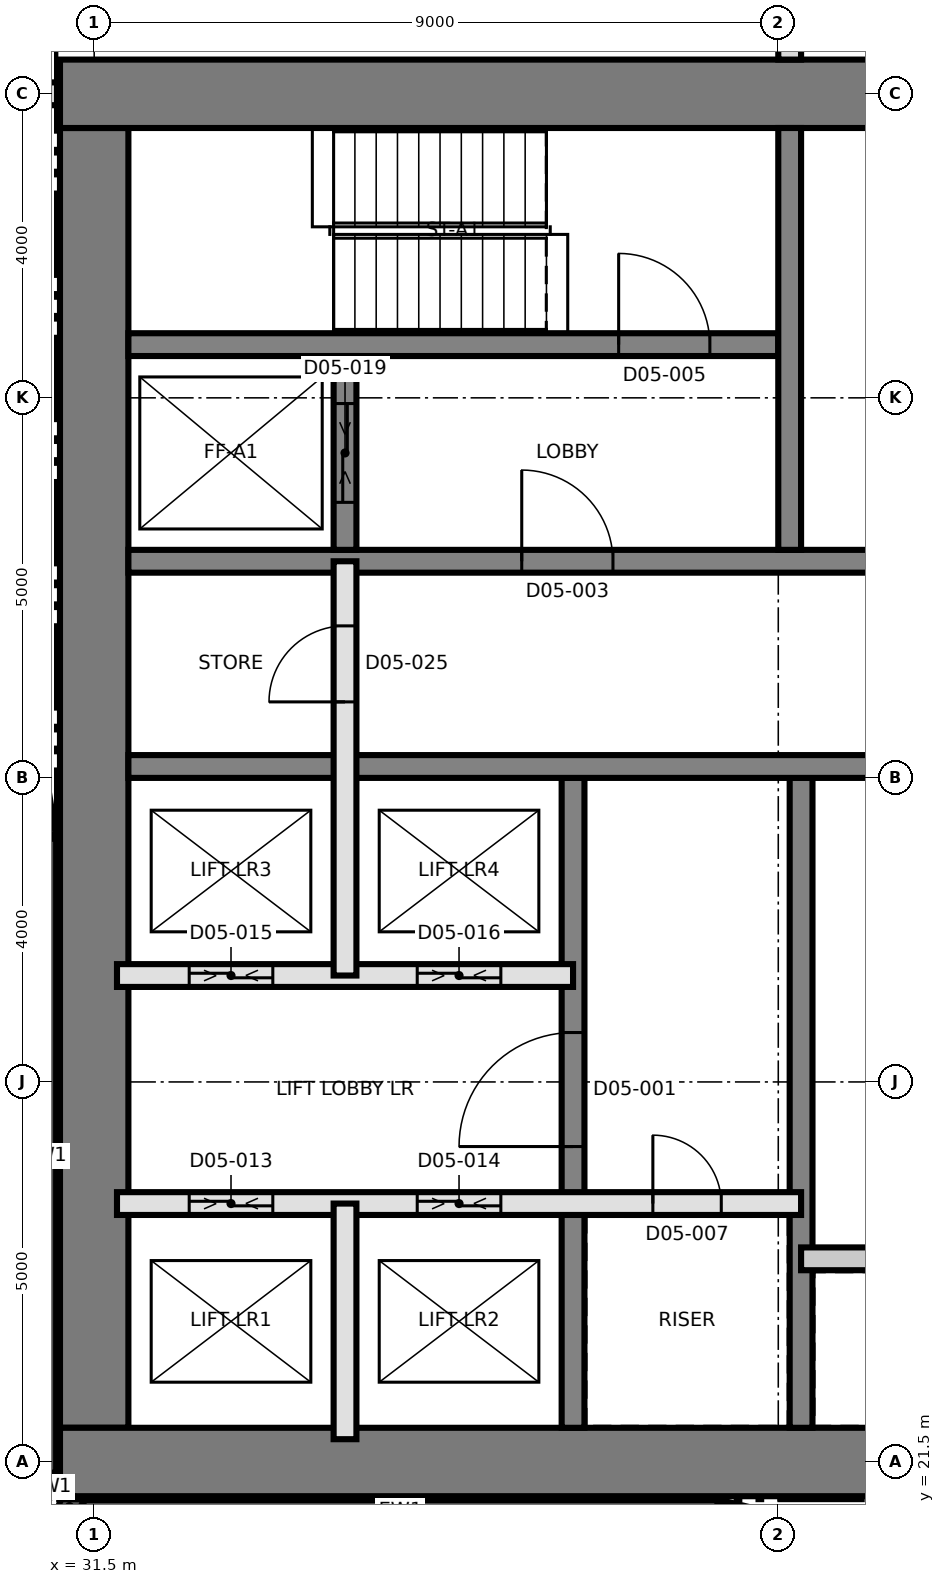
"""IFC4 building model, lengths in metres.
Left out: names, types, materials, properties, quantities, classifications, styles, units other than length and angle.
Written with IfcOpenShell. Run it as: python <this file> out.ifc"""

import sys

from ifc_helpers import new_model, si_unit, direction, frame, frame_2d, origin, place, context, subcontext, project, spatial, rectangle, extrude, element, fill, save


model = new_model("IFC4")
c1 = context("Model", 3, precision=1e-05, world=origin(), true_north=direction((0.0, 1.0)))
c2 = subcontext(c1, "Body", "Model", "MODEL_VIEW")
j1 = project(units=[si_unit("LENGTHUNIT", "METRE"), si_unit("PLANEANGLEUNIT", "RADIAN")], contexts=[c1])
p1 = place(None, origin())
s1 = spatial("IfcSite", under=j1, at=p1, CompositionType="ELEMENT")
p2 = place(p1, origin())
s2 = spatial("IfcBuilding", under=s1, at=p2, CompositionType="ELEMENT")
p3 = place(p2, frame((0.0, 0.0, 74.2)))
s3 = spatial("IfcBuildingStorey", under=s2, at=p3, CompositionType="ELEMENT", Elevation=74.2)
p4 = place(p3, frame((31.5, 21.95, 0.0), z_axis=(0.0, 0.0, 1.0), x_axis=(0.0, 1.0, 0.0)))
e1 = element("IfcWall", 1, at=p4, inside=s3, PredefinedType="SHEAR", context=c2, shape_type="SweptSolid", body=[
    extrude(rectangle(XDim=17.1, YDim=0.9, at=frame_2d((8.55, 0.0))), origin(), (0.0, 0.0, 1.0), 3.7),
])
p5 = place(p3, frame((31.05, 21.5, 0.0), z_axis=(0.0, 0.0, 1.0), x_axis=(1.0, 0.0, 0.0)))
e2 = element("IfcWall", 2, at=p5, inside=s3, PredefinedType="SHEAR", context=c2, shape_type="SweptSolid", body=[
    extrude(rectangle(XDim=27.0, YDim=0.9, at=frame_2d((13.5, 0.0))), origin(), (0.0, 0.0, 1.0), 3.7),
])
p6 = place(p3, frame((31.05, 39.5, 0.0), z_axis=(0.0, 0.0, 1.0), x_axis=(1.0, 0.0, 0.0)))
e3 = element("IfcWall", 3, at=p6, inside=s3, PredefinedType="SHEAR", context=c2, shape_type="SweptSolid", body=[
    extrude(rectangle(XDim=27.0, YDim=0.9, at=frame_2d((13.5, 0.0))), origin(), (0.0, 0.0, 1.0), 3.7),
])
p7 = place(p6, frame((10.65, 0.0, 0.0)))
e4 = element("IfcOpeningElement", 4, at=p7, cuts=e3, PredefinedType="OPENING", context=c2, shape_type="SweptSolid", body=[
    extrude(rectangle(XDim=1.2, YDim=2.1, at=frame_2d((0.6, 1.05))), frame((0.0, 0.46, 0.0), z_axis=(0.0, -1.0, 0.0), x_axis=(1.0, 0.0, 0.0)), (0.0, 0.0, 1.0), 0.92),
])
p8 = place(p3, frame((37.8, 21.95, 0.0), z_axis=(0.0, 0.0, 1.0), x_axis=(0.0, 1.0, 0.0)))
e5 = element("IfcWall", 5, at=p8, inside=s3, PredefinedType="SHEAR", context=c2, shape_type="SweptSolid", body=[
    extrude(rectangle(XDim=8.55, YDim=0.3, at=frame_2d((4.275, 0.0))), origin(), (0.0, 0.0, 1.0), 3.7),
])
p9 = place(p8, frame((3.7, 0.0, 0.0)))
e6 = element("IfcOpeningElement", 6, at=p9, cuts=e5, PredefinedType="OPENING", context=c2, shape_type="SweptSolid", body=[
    extrude(rectangle(XDim=1.5, YDim=2.1, at=frame_2d((0.75, 1.05))), frame((0.0, 0.16, 0.0), z_axis=(0.0, -1.0, 0.0), x_axis=(1.0, 0.0, 0.0)), (0.0, 0.0, 1.0), 0.32),
])
p10 = place(p3, frame((40.8, 21.95, 0.0), z_axis=(0.0, 0.0, 1.0), x_axis=(0.0, 1.0, 0.0)))
e7 = element("IfcWall", 7, at=p10, inside=s3, PredefinedType="SHEAR", context=c2, shape_type="SweptSolid", body=[
    extrude(rectangle(XDim=8.55, YDim=0.3, at=frame_2d((4.275, 0.0))), origin(), (0.0, 0.0, 1.0), 3.7),
])
p11 = place(p3, frame((31.95, 30.65, 0.0), z_axis=(0.0, 0.0, 1.0), x_axis=(1.0, 0.0, 0.0)))
e8 = element("IfcWall", 8, at=p11, inside=s3, PredefinedType="SHEAR", context=c2, shape_type="SweptSolid", body=[
    extrude(rectangle(XDim=26.1, YDim=0.3, at=frame_2d((13.05, 0.0))), origin(), (0.0, 0.0, 1.0), 3.7),
])
p12 = place(p11, frame((24.55, 0.0, 0.0)))
e9 = element("IfcOpeningElement", 9, at=p12, cuts=e8, PredefinedType="OPENING", context=c2, shape_type="SweptSolid", body=[
    extrude(rectangle(XDim=1.0, YDim=2.1, at=frame_2d((0.5, 1.05))), frame((0.0, 0.16, 0.0), z_axis=(0.0, -1.0, 0.0), x_axis=(1.0, 0.0, 0.0)), (0.0, 0.0, 1.0), 0.32),
])
p13 = place(p11, frame((11.35, 0.0, 0.0)))
e10 = element("IfcOpeningElement", 10, at=p13, cuts=e8, PredefinedType="OPENING", context=c2, shape_type="SweptSolid", body=[
    extrude(rectangle(XDim=1.0, YDim=2.1, at=frame_2d((0.5, 1.05))), frame((0.0, 0.16, 0.0), z_axis=(0.0, -1.0, 0.0), x_axis=(1.0, 0.0, 0.0)), (0.0, 0.0, 1.0), 0.32),
])
p14 = place(p3, frame((31.95, 33.35, 0.0), z_axis=(0.0, 0.0, 1.0), x_axis=(1.0, 0.0, 0.0)))
e11 = element("IfcWall", 11, at=p14, inside=s3, PredefinedType="SHEAR", context=c2, shape_type="SweptSolid", body=[
    extrude(rectangle(XDim=26.1, YDim=0.3, at=frame_2d((13.05, 0.0))), origin(), (0.0, 0.0, 1.0), 3.7),
])
p15 = place(p14, frame((13.7, 0.0, 0.0)))
e12 = element("IfcOpeningElement", 12, at=p15, cuts=e11, PredefinedType="OPENING", context=c2, shape_type="SweptSolid", body=[
    extrude(rectangle(XDim=1.4, YDim=2.1, at=frame_2d((0.7, 1.05))), frame((0.0, 0.16, 0.0), z_axis=(0.0, -1.0, 0.0), x_axis=(1.0, 0.0, 0.0)), (0.0, 0.0, 1.0), 0.32),
])
p16 = place(p14, frame((5.175, 0.0, 0.0)))
e13 = element("IfcOpeningElement", 13, at=p16, cuts=e11, PredefinedType="OPENING", context=c2, shape_type="SweptSolid", body=[
    extrude(rectangle(XDim=1.2, YDim=2.1, at=frame_2d((0.6, 1.05))), frame((0.0, 0.16, 0.0), z_axis=(0.0, -1.0, 0.0), x_axis=(1.0, 0.0, 0.0)), (0.0, 0.0, 1.0), 0.32),
])
p17 = place(p14, frame((19.725, 0.0, 0.0)))
e14 = element("IfcOpeningElement", 14, at=p17, cuts=e11, PredefinedType="OPENING", context=c2, shape_type="SweptSolid", body=[
    extrude(rectangle(XDim=1.2, YDim=2.1, at=frame_2d((0.6, 1.05))), frame((0.0, 0.16, 0.0), z_axis=(0.0, -1.0, 0.0), x_axis=(1.0, 0.0, 0.0)), (0.0, 0.0, 1.0), 0.32),
])
p18 = place(p3, frame((31.95, 36.2, 0.0), z_axis=(0.0, 0.0, 1.0), x_axis=(1.0, 0.0, 0.0)))
e15 = element("IfcWall", 15, at=p18, inside=s3, PredefinedType="SHEAR", context=c2, shape_type="SweptSolid", body=[
    extrude(rectangle(XDim=8.55, YDim=0.3, at=frame_2d((4.275, 0.0))), origin(), (0.0, 0.0, 1.0), 3.7),
])
p19 = place(p18, frame((6.45, 0.0, 0.0)))
e16 = element("IfcOpeningElement", 16, at=p19, cuts=e15, PredefinedType="OPENING", context=c2, shape_type="SweptSolid", body=[
    extrude(rectangle(XDim=1.2, YDim=2.1, at=frame_2d((0.6, 1.05))), frame((0.0, 0.16, 0.0), z_axis=(0.0, -1.0, 0.0), x_axis=(1.0, 0.0, 0.0)), (0.0, 0.0, 1.0), 0.32),
])
p20 = place(p3, frame((40.65, 33.5, 0.0), z_axis=(0.0, 0.0, 1.0), x_axis=(0.0, 1.0, 0.0)))
e17 = element("IfcWall", 17, at=p20, inside=s3, PredefinedType="SHEAR", context=c2, shape_type="SweptSolid", body=[
    extrude(rectangle(XDim=5.55, YDim=0.3, at=frame_2d((2.775, 0.0))), origin(), (0.0, 0.0, 1.0), 3.7),
])
p21 = place(p3, frame((34.8, 33.5, 0.0), z_axis=(0.0, 0.0, 1.0), x_axis=(0.0, 1.0, 0.0)))
e18 = element("IfcWall", 18, at=p21, inside=s3, PredefinedType="SHEAR", context=c2, shape_type="SweptSolid", body=[
    extrude(rectangle(XDim=2.55, YDim=0.3, at=frame_2d((1.275, 0.0))), origin(), (0.0, 0.0, 1.0), 3.7),
])
p22 = place(p21, frame((0.625, 0.0, 0.0)))
e19 = element("IfcOpeningElement", 19, at=p22, cuts=e18, PredefinedType="OPENING", context=c2, shape_type="SweptSolid", body=[
    extrude(rectangle(XDim=1.3, YDim=2.4, at=frame_2d((0.65, 1.2))), frame((0.0, 0.16, 0.0), z_axis=(0.0, -1.0, 0.0), x_axis=(1.0, 0.0, 0.0)), (0.0, 0.0, 1.0), 0.32),
])
p23 = place(p3, frame((30.85, 29.699, 0.0), z_axis=(0.0, 0.0, 1.0), x_axis=(0.0, -1.0, 0.0)))
e20 = element("IfcWall", 20, at=p23, inside=s3, PredefinedType="SOLIDWALL", context=c2, shape_type="SweptSolid", body=[
    extrude(rectangle(XDim=8.34, YDim=0.3, at=frame_2d((4.17, 0.0))), origin(), (0.0, 0.0, 1.0), 3.4),
])
for number, where, z_axis, x_axis in (
    (21, (30.861, 21.302, 0.0), (0.0, 0.0, 1.0), (0.383, -0.924, 0.0)),
    (22, (31.048, 20.967, 0.0), (0.0, 0.0, 1.0), (0.924, -0.383, 0.0)),
):
    element("IfcWall", number, at=place(p3, frame(where, z_axis=z_axis, x_axis=x_axis)), inside=s3, PredefinedType="SOLIDWALL", context=c2, shape_type="SweptSolid", body=[
        extrude(rectangle(XDim=0.275, YDim=0.3, at=frame_2d((0.138, 0.0))), origin(), (0.0, 0.0, 1.0), 3.4),
    ])
p24 = place(p3, frame((31.36, 20.85, 0.0), z_axis=(0.0, 0.0, 1.0), x_axis=(1.0, 0.0, 0.0)))
e23 = element("IfcWall", 23, at=p24, inside=s3, PredefinedType="SOLIDWALL", context=c2, shape_type="SweptSolid", body=[
    extrude(rectangle(XDim=8.34, YDim=0.3, at=frame_2d((4.17, 0.0))), origin(), (0.0, 0.0, 1.0), 3.4),
])
p25 = place(p3, frame((39.735, 20.846, 0.0), z_axis=(0.0, 0.0, 1.0), x_axis=(0.97206095595, -0.234728562212, 0.0)))
e24 = element("IfcWall", 24, at=p25, inside=s3, PredefinedType="SOLIDWALL", context=c2, shape_type="SweptSolid", body=[
    extrude(rectangle(XDim=2.35, YDim=0.3, at=frame_2d((1.175, 0.0))), origin(), (0.0, 0.0, 1.0), 3.4),
])
p26 = place(p3, frame((30.152, 34.0, 0.0), z_axis=(0.0, 0.0, 1.0), x_axis=(0.160697303067, -0.987003736967, 0.0)))
e25 = element("IfcWall", 25, at=p26, inside=s3, PredefinedType="SOLIDWALL", context=c2, shape_type="SweptSolid", body=[
    extrude(rectangle(XDim=4.333, YDim=0.3, at=frame_2d((2.167, 0.0))), origin(), (0.0, 0.0, 1.0), 3.4),
])
p27 = place(p26, frame((0.366, 0.0, 0.9)))
e26 = element("IfcOpeningElement", 26, at=p27, cuts=e25, PredefinedType="OPENING", context=c2, shape_type="SweptSolid", body=[
    extrude(rectangle(XDim=3.6, YDim=1.5, at=frame_2d((1.8, 0.75))), frame((0.0, 0.16, 0.0), z_axis=(0.0, -1.0, 0.0), x_axis=(1.0, 0.0, 0.0)), (0.0, 0.0, 1.0), 0.32),
])
p28 = place(p3, frame((40.8, 24.173, 0.0), z_axis=(0.0, 0.0, 1.0), x_axis=(1.0, 0.0, 0.0)))
e27 = element("IfcWall", 27, at=p28, inside=s3, PredefinedType="PARTITIONING", context=c2, shape_type="SweptSolid", body=[
    extrude(rectangle(XDim=6.0, YDim=0.3, at=frame_2d((3.0, 0.0))), origin(), (0.0, 0.0, 1.0), 3.4),
])
p29 = place(p28, frame((2.5, 0.0, 0.0)))
e28 = element("IfcOpeningElement", 28, at=p29, cuts=e27, PredefinedType="OPENING", context=c2, shape_type="SweptSolid", body=[
    extrude(rectangle(XDim=1.0, YDim=2.1, at=frame_2d((0.5, 1.05))), frame((0.0, 0.16, 0.0), z_axis=(0.0, -1.0, 0.0), x_axis=(1.0, 0.0, 0.0)), (0.0, 0.0, 1.0), 0.32),
])
p30 = place(p3, frame((31.8, 24.9, 0.0), z_axis=(0.0, 0.0, 1.0), x_axis=(1.0, 0.0, 0.0)))
e29 = element("IfcWall", 29, at=p30, inside=s3, PredefinedType="SOLIDWALL", context=c2, shape_type="SweptSolid", body=[
    extrude(rectangle(XDim=9.0, YDim=0.3, at=frame_2d((4.5, 0.0))), origin(), (0.0, 0.0, 1.0), 3.4),
])
p31 = place(p30, frame((7.05, 0.0, 0.0)))
e30 = element("IfcOpeningElement", 30, at=p31, cuts=e29, PredefinedType="OPENING", context=c2, shape_type="SweptSolid", body=[
    extrude(rectangle(XDim=0.9, YDim=2.1, at=frame_2d((0.45, 1.05))), frame((0.0, 0.16, 0.0), z_axis=(0.0, -1.0, 0.0), x_axis=(1.0, 0.0, 0.0)), (0.0, 0.0, 1.0), 0.32),
])
p32 = place(p30, frame((0.95, 0.0, 0.0)))
e31 = element("IfcOpeningElement", 31, at=p32, cuts=e29, PredefinedType="OPENING", context=c2, shape_type="SweptSolid", body=[
    extrude(rectangle(XDim=1.1, YDim=2.4, at=frame_2d((0.55, 1.2))), frame((0.0, 0.16, 0.0), z_axis=(0.0, -1.0, 0.0), x_axis=(1.0, 0.0, 0.0)), (0.0, 0.0, 1.0), 0.32),
])
p33 = place(p30, frame((3.95, 0.0, 0.0)))
e32 = element("IfcOpeningElement", 32, at=p33, cuts=e29, PredefinedType="OPENING", context=c2, shape_type="SweptSolid", body=[
    extrude(rectangle(XDim=1.1, YDim=2.4, at=frame_2d((0.55, 1.2))), frame((0.0, 0.16, 0.0), z_axis=(0.0, -1.0, 0.0), x_axis=(1.0, 0.0, 0.0)), (0.0, 0.0, 1.0), 0.32),
])
p34 = place(p3, frame((31.8, 27.9, 0.0), z_axis=(0.0, 0.0, 1.0), x_axis=(1.0, 0.0, 0.0)))
e33 = element("IfcWall", 33, at=p34, inside=s3, PredefinedType="SOLIDWALL", context=c2, shape_type="SweptSolid", body=[
    extrude(rectangle(XDim=6.0, YDim=0.3, at=frame_2d((3.0, 0.0))), origin(), (0.0, 0.0, 1.0), 3.4),
])
p35 = place(p34, frame((0.95, 0.0, 0.0)))
e34 = element("IfcOpeningElement", 34, at=p35, cuts=e33, PredefinedType="OPENING", context=c2, shape_type="SweptSolid", body=[
    extrude(rectangle(XDim=1.1, YDim=2.4, at=frame_2d((0.55, 1.2))), frame((0.0, 0.16, 0.0), z_axis=(0.0, -1.0, 0.0), x_axis=(1.0, 0.0, 0.0)), (0.0, 0.0, 1.0), 0.32),
])
p36 = place(p34, frame((3.95, 0.0, 0.0)))
e35 = element("IfcOpeningElement", 35, at=p36, cuts=e33, PredefinedType="OPENING", context=c2, shape_type="SweptSolid", body=[
    extrude(rectangle(XDim=1.1, YDim=2.4, at=frame_2d((0.55, 1.2))), frame((0.0, 0.16, 0.0), z_axis=(0.0, -1.0, 0.0), x_axis=(1.0, 0.0, 0.0)), (0.0, 0.0, 1.0), 0.32),
])
p37 = place(p3, frame((34.8, 21.8, 0.0), z_axis=(0.0, 0.0, 1.0), x_axis=(0.0, 1.0, 0.0)))
e36 = element("IfcWall", 36, at=p37, inside=s3, PredefinedType="SOLIDWALL", context=c2, shape_type="SweptSolid", body=[
    extrude(rectangle(XDim=3.1, YDim=0.3, at=frame_2d((1.55, 0.0))), origin(), (0.0, 0.0, 1.0), 3.4),
])
p38 = place(p3, frame((34.8, 27.9, 0.0), z_axis=(0.0, 0.0, 1.0), x_axis=(0.0, 1.0, 0.0)))
e37 = element("IfcWall", 37, at=p38, inside=s3, PredefinedType="SOLIDWALL", context=c2, shape_type="SweptSolid", body=[
    extrude(rectangle(XDim=5.45, YDim=0.3, at=frame_2d((2.725, 0.0))), origin(), (0.0, 0.0, 1.0), 3.4),
])
p39 = place(p38, frame((3.6, 0.0, 0.0)))
e38 = element("IfcOpeningElement", 38, at=p39, cuts=e37, PredefinedType="OPENING", context=c2, shape_type="SweptSolid", body=[
    extrude(rectangle(XDim=1.0, YDim=2.1, at=frame_2d((0.5, 1.05))), frame((0.0, 0.16, 0.0), z_axis=(0.0, -1.0, 0.0), x_axis=(1.0, 0.0, 0.0)), (0.0, 0.0, 1.0), 0.32),
])
p40 = place(p3, frame((30.35, 39.5, 0.0), z_axis=(0.0, 0.0, 1.0), x_axis=(1.0, 0.0, 0.0)))
e39 = element("IfcWall", 39, at=p40, inside=s3, PredefinedType="PARTITIONING", context=c2, shape_type="SweptSolid", body=[
    extrude(rectangle(XDim=0.68, YDim=0.3, at=frame_2d((0.34, 0.0))), origin(), (0.0, 0.0, 1.0), 3.4),
])
p41 = place(p3, frame((40.65, 39.95, 0.0), z_axis=(0.0, 0.0, 1.0), x_axis=(0.0, 1.0, 0.0)))
e40 = element("IfcWall", 40, at=p41, inside=s3, PredefinedType="PARTITIONING", context=c2, shape_type="SweptSolid", body=[
    extrude(rectangle(XDim=36.94, YDim=0.3, at=frame_2d((18.47, 0.0))), origin(), (0.0, 0.0, 1.0), 3.4),
])
p42 = place(p41, frame((0.7, 0.0, 0.0)))
e41 = element("IfcOpeningElement", 41, at=p42, cuts=e40, PredefinedType="OPENING", context=c2, shape_type="SweptSolid", body=[
    extrude(rectangle(XDim=1.0, YDim=2.1, at=frame_2d((0.5, 1.05))), frame((0.0, 0.16, 0.0), z_axis=(0.0, -1.0, 0.0), x_axis=(1.0, 0.0, 0.0)), (0.0, 0.0, 1.0), 0.32),
])
p43 = place(p41, frame((6.55, 0.0, 0.0)))
e42 = element("IfcOpeningElement", 42, at=p43, cuts=e40, PredefinedType="OPENING", context=c2, shape_type="SweptSolid", body=[
    extrude(rectangle(XDim=1.0, YDim=2.1, at=frame_2d((0.5, 1.05))), frame((0.0, 0.16, 0.0), z_axis=(0.0, -1.0, 0.0), x_axis=(1.0, 0.0, 0.0)), (0.0, 0.0, 1.0), 0.32),
])
p44 = place(p41, frame((9.22, 0.0, 0.0)))
e43 = element("IfcOpeningElement", 43, at=p44, cuts=e40, PredefinedType="OPENING", context=c2, shape_type="SweptSolid", body=[
    extrude(rectangle(XDim=1.0, YDim=2.1, at=frame_2d((0.5, 1.05))), frame((0.0, 0.16, 0.0), z_axis=(0.0, -1.0, 0.0), x_axis=(1.0, 0.0, 0.0)), (0.0, 0.0, 1.0), 0.32),
])
p45 = place(p41, frame((15.07, 0.0, 0.0)))
e44 = element("IfcOpeningElement", 44, at=p45, cuts=e40, PredefinedType="OPENING", context=c2, shape_type="SweptSolid", body=[
    extrude(rectangle(XDim=1.0, YDim=2.1, at=frame_2d((0.5, 1.05))), frame((0.0, 0.16, 0.0), z_axis=(0.0, -1.0, 0.0), x_axis=(1.0, 0.0, 0.0)), (0.0, 0.0, 1.0), 0.32),
])
p46 = place(p41, frame((21.05, 0.0, 0.0)))
e45 = element("IfcOpeningElement", 45, at=p46, cuts=e40, PredefinedType="OPENING", context=c2, shape_type="SweptSolid", body=[
    extrude(rectangle(XDim=1.0, YDim=2.4, at=frame_2d((0.5, 1.2))), frame((0.0, 0.16, 0.0), z_axis=(0.0, -1.0, 0.0), x_axis=(1.0, 0.0, 0.0)), (0.0, 0.0, 1.0), 0.32),
])
p47 = place(p9, origin())
e46 = element("IfcDoor", 46, at=p47, inside=s3, OperationType="SINGLE_SWING_LEFT", PredefinedType="DOOR", context=c2, shape_type="SweptSolid", body=[
    extrude(rectangle(XDim=1.5, YDim=2.1, at=frame_2d((0.75, 1.05))), frame((0.0, 0.025, 0.0), z_axis=(0.0, -1.0, 0.0), x_axis=(1.0, 0.0, 0.0)), (0.0, 0.0, 1.0), 0.05),
])
fill(e6, e46)
p48 = place(p16, origin())
e47 = element("IfcDoor", 47, at=p48, inside=s3, OperationType="SINGLE_SWING_LEFT", PredefinedType="DOOR", context=c2, shape_type="SweptSolid", body=[
    extrude(rectangle(XDim=1.2, YDim=2.1, at=frame_2d((0.6, 1.05))), frame((0.0, 0.025, 0.0), z_axis=(0.0, -1.0, 0.0), x_axis=(1.0, 0.0, 0.0)), (0.0, 0.0, 1.0), 0.05),
])
fill(e13, e47)
p49 = place(p19, origin())
e48 = element("IfcDoor", 48, at=p49, inside=s3, OperationType="SINGLE_SWING_RIGHT", PredefinedType="DOOR", context=c2, shape_type="SweptSolid", body=[
    extrude(rectangle(XDim=1.2, YDim=2.1, at=frame_2d((0.6, 1.05))), frame((0.0, 0.025, 0.0), z_axis=(0.0, -1.0, 0.0), x_axis=(1.0, 0.0, 0.0)), (0.0, 0.0, 1.0), 0.05),
])
fill(e16, e48)
p50 = place(p31, origin())
e49 = element("IfcDoor", 49, at=p50, inside=s3, OperationType="SINGLE_SWING_LEFT", PredefinedType="DOOR", context=c2, shape_type="SweptSolid", body=[
    extrude(rectangle(XDim=0.9, YDim=2.1, at=frame_2d((0.45, 1.05))), frame((0.0, 0.025, 0.0), z_axis=(0.0, -1.0, 0.0), x_axis=(1.0, 0.0, 0.0)), (0.0, 0.0, 1.0), 0.05),
])
fill(e30, e49)
p51 = place(p32, origin())
e50 = element("IfcDoor", 50, at=p51, inside=s3, OperationType="SLIDING_TO_LEFT", PredefinedType="DOOR", context=c2, shape_type="SweptSolid", body=[
    extrude(rectangle(XDim=1.1, YDim=2.4, at=frame_2d((0.55, 1.2))), frame((0.0, 0.025, 0.0), z_axis=(0.0, -1.0, 0.0), x_axis=(1.0, 0.0, 0.0)), (0.0, 0.0, 1.0), 0.05),
])
fill(e31, e50)
p52 = place(p33, origin())
e51 = element("IfcDoor", 51, at=p52, inside=s3, OperationType="SLIDING_TO_LEFT", PredefinedType="DOOR", context=c2, shape_type="SweptSolid", body=[
    extrude(rectangle(XDim=1.1, YDim=2.4, at=frame_2d((0.55, 1.2))), frame((0.0, 0.025, 0.0), z_axis=(0.0, -1.0, 0.0), x_axis=(1.0, 0.0, 0.0)), (0.0, 0.0, 1.0), 0.05),
])
fill(e32, e51)
p53 = place(p35, origin())
e52 = element("IfcDoor", 52, at=p53, inside=s3, OperationType="SLIDING_TO_LEFT", PredefinedType="DOOR", context=c2, shape_type="SweptSolid", body=[
    extrude(rectangle(XDim=1.1, YDim=2.4, at=frame_2d((0.55, 1.2))), frame((0.0, 0.025, 0.0), z_axis=(0.0, -1.0, 0.0), x_axis=(1.0, 0.0, 0.0)), (0.0, 0.0, 1.0), 0.05),
])
fill(e34, e52)
p54 = place(p36, origin())
e53 = element("IfcDoor", 53, at=p54, inside=s3, OperationType="SLIDING_TO_LEFT", PredefinedType="DOOR", context=c2, shape_type="SweptSolid", body=[
    extrude(rectangle(XDim=1.1, YDim=2.4, at=frame_2d((0.55, 1.2))), frame((0.0, 0.025, 0.0), z_axis=(0.0, -1.0, 0.0), x_axis=(1.0, 0.0, 0.0)), (0.0, 0.0, 1.0), 0.05),
])
fill(e35, e53)
p55 = place(p22, origin())
e54 = element("IfcDoor", 54, at=p55, inside=s3, OperationType="SLIDING_TO_LEFT", PredefinedType="DOOR", context=c2, shape_type="SweptSolid", body=[
    extrude(rectangle(XDim=1.3, YDim=2.4, at=frame_2d((0.65, 1.2))), frame((0.0, 0.025, 0.0), z_axis=(0.0, -1.0, 0.0), x_axis=(1.0, 0.0, 0.0)), (0.0, 0.0, 1.0), 0.05),
])
fill(e19, e54)
p56 = place(p39, origin())
e55 = element("IfcDoor", 55, at=p56, inside=s3, OperationType="SINGLE_SWING_LEFT", PredefinedType="DOOR", context=c2, shape_type="SweptSolid", body=[
    extrude(rectangle(XDim=1.0, YDim=2.1, at=frame_2d((0.5, 1.05))), frame((0.0, 0.025, 0.0), z_axis=(0.0, -1.0, 0.0), x_axis=(1.0, 0.0, 0.0)), (0.0, 0.0, 1.0), 0.05),
])
fill(e38, e55)
save(model, sys.argv[1])
